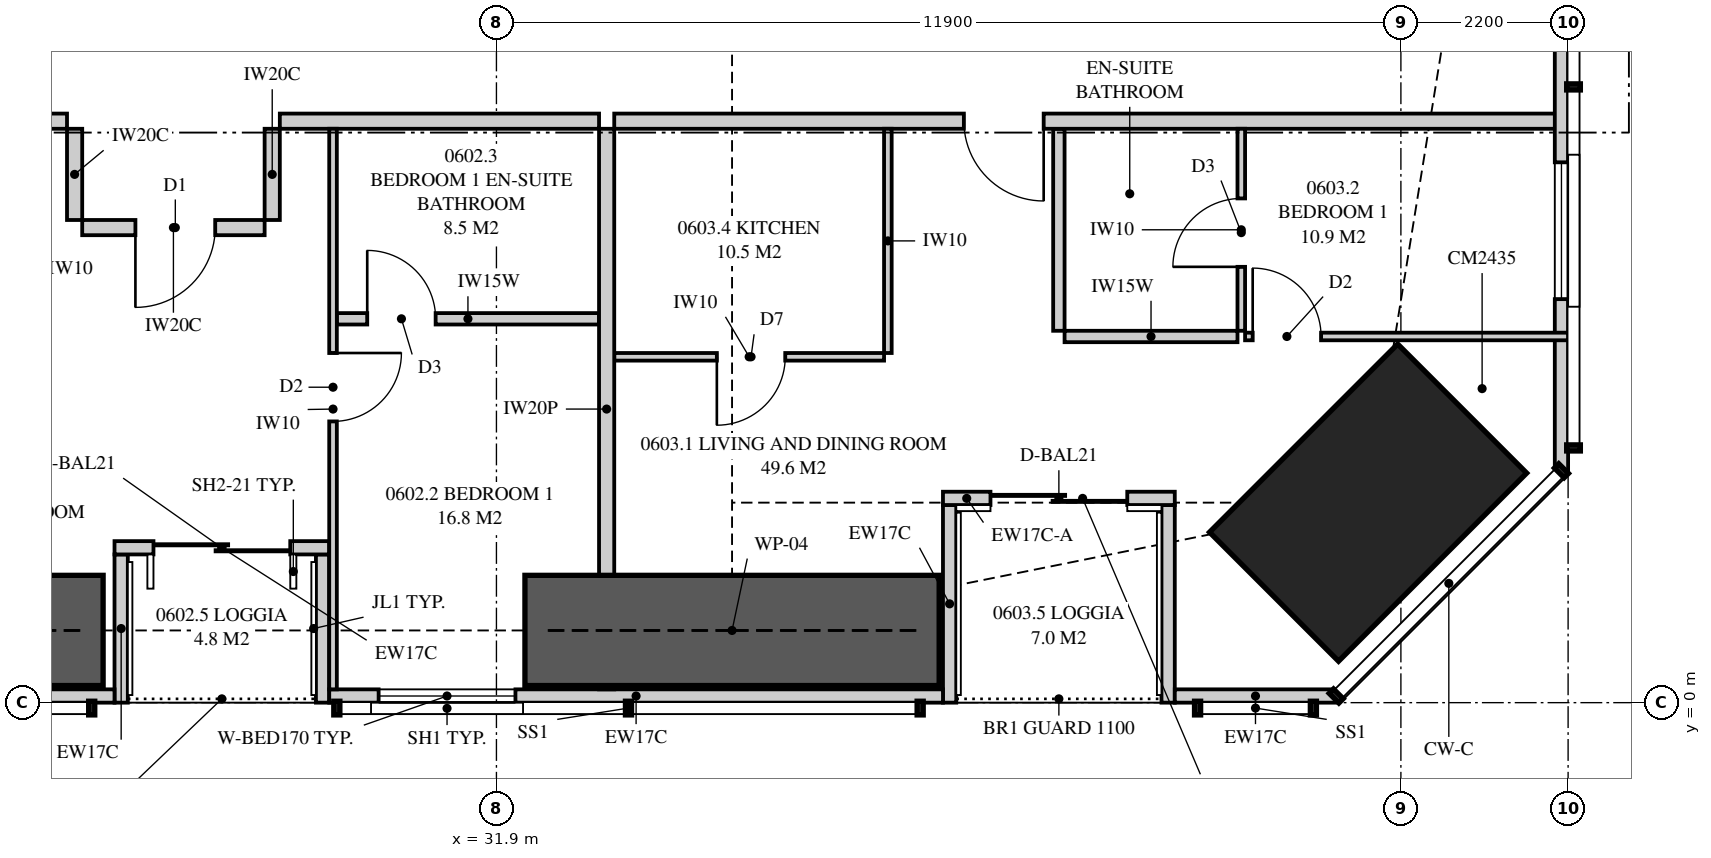
"""IFC4 building model, lengths in metres.
Left out: names, types, materials, properties, quantities, classifications, styles, units other than length and angle.
Written with IfcOpenShell. Run it as: python <this file> out.ifc"""

import sys

from ifc_helpers import new_model, si_unit, direction, frame, frame_2d, origin, origin_2d, place, context, subcontext, project, spatial, polyline, rectangle, outline, extrude, element, fill, save


model = new_model("IFC4")
c1 = context("Model", 3, precision=1e-05, world=origin(), true_north=direction((0.0, 1.0)))
c2 = subcontext(c1, "Body", "Model", "MODEL_VIEW")
j1 = project(units=[si_unit("LENGTHUNIT", "METRE"), si_unit("PLANEANGLEUNIT", "RADIAN")], contexts=[c1])
p1 = place(None, origin())
s1 = spatial("IfcSite", under=j1, at=p1, CompositionType="ELEMENT")
p2 = place(p1, origin())
s2 = spatial("IfcBuilding", under=s1, at=p2, CompositionType="ELEMENT")
p3 = place(p2, frame((0.0, 0.0, 27.7)))
s3 = spatial("IfcBuildingStorey", under=s2, at=p3, CompositionType="ELEMENT", Elevation=27.7)
p4 = place(p3, frame((43.369, 2.631, 0.0), z_axis=(0.0, 0.0, 1.0), x_axis=(-0.707106781187, 0.707106781187, 0.0)))
e1 = element("IfcColumn", 1, at=p4, inside=s3, PredefinedType="COLUMN", context=c2, shape_type="SweptSolid", body=[
    extrude(rectangle(XDim=2.4, YDim=3.5, at=origin_2d()), origin(), (0.0, 0.0, 1.0), 3.35),
])
p5 = place(p3, frame((19.025, 0.087, 0.0), z_axis=(0.0, 0.0, 1.0), x_axis=(1.0, 0.0, 0.0)))
e2 = element("IfcWall", 2, at=p5, inside=s3, PredefinedType="SOLIDWALL", context=c2, shape_type="SweptSolid", body=[
    extrude(rectangle(XDim=7.85, YDim=0.175, at=frame_2d((3.925, 0.0))), origin(), (0.0, 0.0, 1.0), 2.15),
])
p6 = place(p3, frame((29.7, 0.087, 0.0), z_axis=(0.0, 0.0, 1.0), x_axis=(1.0, 0.0, 0.0)))
e3 = element("IfcWall", 3, at=p6, inside=s3, PredefinedType="SOLIDWALL", context=c2, shape_type="SweptSolid", body=[
    extrude(outline(polyline([(0.0, 0.0), (8.075, 0.0), (8.075, 3.11), (5.504, 3.11), (5.504, 2.15), (5.456, 2.15), (5.456, 3.11), (5.3, 3.11), (5.3, 2.15), (0.0, 2.15), (0.0, 0.0)])), frame((0.0, 0.087, 0.0), z_axis=(0.0, -1.0, 0.0), x_axis=(1.0, 0.0, 0.0)), (0.0, 0.0, 1.0), 0.175),
])
p7 = place(p6, frame((0.65, 0.0, 0.4)))
e4 = element("IfcOpeningElement", 4, at=p7, cuts=e3, PredefinedType="OPENING", context=c2, shape_type="SweptSolid", body=[
    extrude(rectangle(XDim=1.8, YDim=1.7, at=frame_2d((0.9, 0.85))), frame((0.0, 0.097, 0.0), z_axis=(0.0, -1.0, 0.0), x_axis=(1.0, 0.0, 0.0)), (0.0, 0.0, 1.0), 0.195),
])
p8 = place(p3, frame((40.825, 0.087, 0.0), z_axis=(0.0, 0.0, 1.0), x_axis=(1.0, 0.0, 0.0)))
e5 = element("IfcWall", 5, at=p8, inside=s3, PredefinedType="SOLIDWALL", context=c2, shape_type="SweptSolid", body=[
    extrude(rectangle(XDim=2.124, YDim=0.175, at=frame_2d((1.062, 0.0))), origin(), (0.0, 0.0, 1.0), 3.11),
])
p9 = place(p3, frame((26.875, 2.038, 0.0), z_axis=(0.0, 0.0, 1.0), x_axis=(1.0, 0.0, 0.0)))
e6 = element("IfcWall", 6, at=p9, inside=s3, PredefinedType="SOLIDWALL", context=c2, shape_type="SweptSolid", body=[
    extrude(rectangle(XDim=2.825, YDim=0.175, at=frame_2d((1.413, 0.0))), origin(), (0.0, 0.0, 1.0), 3.11),
])
p10 = place(p9, frame((0.512, 0.0, 0.0)))
e7 = element("IfcOpeningElement", 7, at=p10, cuts=e6, PredefinedType="OPENING", context=c2, shape_type="SweptSolid", body=[
    extrude(rectangle(XDim=1.8, YDim=2.1, at=frame_2d((0.9, 1.05))), frame((0.0, 0.097, 0.0), z_axis=(0.0, -1.0, 0.0), x_axis=(1.0, 0.0, 0.0)), (0.0, 0.0, 1.0), 0.195),
])
for number, where, z_axis, x_axis in (
    (8, (26.962, 0.0, 0.0), (0.0, 0.0, 1.0), (0.0, 1.0, 0.0)),
    (9, (29.613, 0.0, 0.0), (0.0, 0.0, 1.0), (0.0, 1.0, 0.0)),
):
    element("IfcWall", number, at=place(p3, frame(where, z_axis=z_axis, x_axis=x_axis)), inside=s3, PredefinedType="SOLIDWALL", context=c2, shape_type="SweptSolid", body=[
        extrude(outline(polyline([(0.0, 0.0), (1.95, 0.0), (1.95, 3.11), (1.75, 3.11), (1.75, 2.15), (0.15, 2.15), (0.15, 3.11), (0.0, 3.11), (0.0, 0.0)])), frame((0.0, 0.087, 0.0), z_axis=(0.0, -1.0, 0.0), x_axis=(1.0, 0.0, 0.0)), (0.0, 0.0, 1.0), 0.175),
    ])
p11 = place(p3, frame((37.775, 2.688, 0.0), z_axis=(0.0, 0.0, 1.0), x_axis=(1.0, 0.0, 0.0)))
e10 = element("IfcWall", 10, at=p11, inside=s3, PredefinedType="SOLIDWALL", context=c2, shape_type="SweptSolid", body=[
    extrude(rectangle(XDim=0.625, YDim=0.175, at=frame_2d((0.312, 0.0))), origin(), (0.0, 0.0, 1.0), 2.51),
])
p12 = place(p3, frame((38.4, 2.688, 0.0), z_axis=(0.0, 0.0, 1.0), x_axis=(1.0, 0.0, 0.0)))
e11 = element("IfcWall", 11, at=p12, inside=s3, PredefinedType="SOLIDWALL", context=c2, shape_type="SweptSolid", body=[
    extrude(rectangle(XDim=2.425, YDim=0.175, at=frame_2d((1.212, 0.0))), origin(), (0.0, 0.0, 1.0), 2.15),
])
p13 = place(p12, origin())
e12 = element("IfcOpeningElement", 12, at=p13, cuts=e11, PredefinedType="OPENING", context=c2, shape_type="SweptSolid", body=[
    extrude(rectangle(XDim=1.8, YDim=2.1, at=frame_2d((0.9, 1.05))), frame((0.0, 0.097, 0.0), z_axis=(0.0, -1.0, 0.0), x_axis=(1.0, 0.0, 0.0)), (0.0, 0.0, 1.0), 0.195),
])
p14 = place(p3, frame((37.863, 0.0, 0.0), z_axis=(0.0, 0.0, 1.0), x_axis=(0.0, 1.0, 0.0)))
e13 = element("IfcWall", 13, at=p14, inside=s3, PredefinedType="SOLIDWALL", context=c2, shape_type="SweptSolid", body=[
    extrude(outline(polyline([(0.0, 0.0), (2.6, 0.0), (2.6, 2.51), (2.359, 2.51), (2.359, 2.15), (0.692, 2.15), (0.692, 3.11), (0.0, 3.11), (0.0, 0.0)])), frame((0.0, 0.087, 0.0), z_axis=(0.0, -1.0, 0.0), x_axis=(1.0, 0.0, 0.0)), (0.0, 0.0, 1.0), 0.175),
])
p15 = place(p3, frame((40.738, 0.0, 0.0), z_axis=(0.0, 0.0, 1.0), x_axis=(0.0, 1.0, 0.0)))
e14 = element("IfcWall", 14, at=p15, inside=s3, PredefinedType="SOLIDWALL", context=c2, shape_type="SweptSolid", body=[
    extrude(outline(polyline([(0.0, 0.0), (2.6, 0.0), (2.6, 2.15), (1.269, 2.15), (1.269, 3.11), (0.0, 3.11), (0.0, 0.0)])), frame((0.0, 0.087, 0.0), z_axis=(0.0, -1.0, 0.0), x_axis=(1.0, 0.0, 0.0)), (0.0, 0.0, 1.0), 0.175),
])
p16 = place(p3, frame((45.913, 3.051, 0.0), z_axis=(0.0, 0.0, 1.0), x_axis=(0.0, 1.0, 0.0)))
e15 = element("IfcWall", 15, at=p16, inside=s3, PredefinedType="SOLIDWALL", context=c2, shape_type="SweptSolid", body=[
    extrude(outline(polyline([(0.0, 0.0), (31.897, 0.0), (31.897, 3.11), (22.167, 3.11), (22.167, 2.15), (22.074, 2.15), (22.074, 3.11), (21.949, 3.11), (21.949, 2.15), (9.949, 2.15), (9.949, 3.11), (9.823, 3.11), (9.823, 2.15), (9.73, 2.15), (9.73, 3.11), (0.0, 3.11), (0.0, 0.0)])), frame((0.0, 0.087, 0.0), z_axis=(0.0, -1.0, 0.0), x_axis=(1.0, 0.0, 0.0)), (0.0, 0.0, 1.0), 0.175),
])
p17 = place(p16, frame((2.257, 0.0, 0.4)))
e16 = element("IfcOpeningElement", 16, at=p17, cuts=e15, PredefinedType="OPENING", context=c2, shape_type="SweptSolid", body=[
    extrude(rectangle(XDim=1.8, YDim=1.7, at=frame_2d((0.9, 0.85))), frame((0.0, 0.097, 0.0), z_axis=(0.0, -1.0, 0.0), x_axis=(1.0, 0.0, 0.0)), (0.0, 0.0, 1.0), 0.195),
])
p18 = place(p16, frame((14.849, 0.0, 0.4)))
e17 = element("IfcOpeningElement", 17, at=p18, cuts=e15, PredefinedType="OPENING", context=c2, shape_type="SweptSolid", body=[
    extrude(rectangle(XDim=1.2, YDim=1.7, at=frame_2d((0.6, 0.85))), frame((0.0, 0.097, 0.0), z_axis=(0.0, -1.0, 0.0), x_axis=(1.0, 0.0, 0.0)), (0.0, 0.0, 1.0), 0.195),
])
p19 = place(p16, frame((27.34, 0.0, 0.4)))
e18 = element("IfcOpeningElement", 18, at=p19, cuts=e15, PredefinedType="OPENING", context=c2, shape_type="SweptSolid", body=[
    extrude(rectangle(XDim=1.8, YDim=1.7, at=frame_2d((0.9, 0.85))), frame((0.0, 0.097, 0.0), z_axis=(0.0, -1.0, 0.0), x_axis=(1.0, 0.0, 0.0)), (0.0, 0.0, 1.0), 0.195),
])
p20 = place(p3, frame((33.35, 0.175, 0.0), z_axis=(0.0, 0.0, 1.0), x_axis=(0.0, 1.0, 0.0)))
e19 = element("IfcWall", 19, at=p20, inside=s3, PredefinedType="PARTITIONING", context=c2, shape_type="SweptSolid", body=[
    extrude(outline(polyline([(0.529, 2.15), (0.0, 2.15), (0.0, 0.0), (0.529, 0.0), (0.529, 0.366), (1.021, 0.366), (1.021, 0.0), (7.375, 0.0), (7.375, 3.11), (1.685, 3.11), (1.685, 2.15), (1.021, 2.15), (1.021, 1.784), (0.529, 1.784), (0.529, 2.15)])), frame((0.0, 0.1, 0.0), z_axis=(0.0, -1.0, 0.0), x_axis=(1.0, 0.0, 0.0)), (0.0, 0.0, 1.0), 0.2),
])
p21 = place(p3, frame((22.05, 7.65, 0.0), z_axis=(0.0, 0.0, 1.0), x_axis=(1.0, 0.0, 0.0)))
e20 = element("IfcWall", 20, at=p21, inside=s3, PredefinedType="PARTITIONING", context=c2, shape_type="SweptSolid", body=[
    extrude(outline(polyline([(0.0, 0.0), (4.2, 0.0), (4.2, 3.11), (2.287, 3.11), (2.287, 2.541), (1.613, 2.541), (1.613, 3.11), (0.0, 3.11), (0.0, 0.0)])), frame((0.0, 0.1, 0.0), z_axis=(0.0, -1.0, 0.0), x_axis=(1.0, 0.0, 0.0)), (0.0, 0.0, 1.0), 0.2),
])
p22 = place(p3, frame((29.75, 0.175, 0.0), z_axis=(0.0, 0.0, 1.0), x_axis=(0.0, 1.0, 0.0)))
e21 = element("IfcWall", 21, at=p22, inside=s3, PredefinedType="PARTITIONING", context=c2, shape_type="SweptSolid", body=[
    extrude(outline(polyline([(0.0, 0.0), (7.375, 0.0), (7.375, 3.11), (1.635, 3.11), (1.635, 2.15), (0.0, 2.15), (0.0, 3.11), (0.0, 0.0)])), frame((0.0, 0.05, 0.0), z_axis=(0.0, -1.0, 0.0), x_axis=(1.0, 0.0, 0.0)), (0.0, 0.0, 1.0), 0.1),
])
p23 = place(p22, frame((3.525, 0.0, 0.0)))
e22 = element("IfcOpeningElement", 22, at=p23, cuts=e21, PredefinedType="OPENING", context=c2, shape_type="SweptSolid", body=[
    extrude(rectangle(XDim=0.9, YDim=2.1, at=frame_2d((0.45, 1.05))), frame((0.0, 0.06, 0.0), z_axis=(0.0, -1.0, 0.0), x_axis=(1.0, 0.0, 0.0)), (0.0, 0.0, 1.0), 0.12),
])
p24 = place(p3, frame((29.8, 5.05, 0.0), z_axis=(0.0, 0.0, 1.0), x_axis=(1.0, 0.0, 0.0)))
e23 = element("IfcWall", 23, at=p24, inside=s3, PredefinedType="PLUMBINGWALL", context=c2, shape_type="SweptSolid", body=[
    extrude(rectangle(XDim=3.45, YDim=0.15, at=frame_2d((1.725, 0.0))), origin(), (0.0, 0.0, 1.0), 3.11),
])
p25 = place(p24, frame((0.4, 0.0, 0.0)))
e24 = element("IfcOpeningElement", 24, at=p25, cuts=e23, PredefinedType="OPENING", context=c2, shape_type="SweptSolid", body=[
    extrude(rectangle(XDim=0.9, YDim=2.1, at=frame_2d((0.45, 1.05))), frame((0.0, 0.085, 0.0), z_axis=(0.0, -1.0, 0.0), x_axis=(1.0, 0.0, 0.0)), (0.0, 0.0, 1.0), 0.17),
])
p26 = place(p3, frame((33.45, 7.65, 0.0), z_axis=(0.0, 0.0, 1.0), x_axis=(1.0, 0.0, 0.0)))
e25 = element("IfcWall", 25, at=p26, inside=s3, PredefinedType="PARTITIONING", context=c2, shape_type="SweptSolid", body=[
    extrude(outline(polyline([(0.0, 0.0), (12.55, 0.0), (12.55, 3.11), (11.654, 3.11), (11.654, 2.15), (9.811, 2.15), (9.811, 3.11), (1.887, 3.11), (1.887, 2.541), (1.213, 2.541), (1.213, 3.11), (0.0, 3.11), (0.0, 0.0)])), frame((0.0, 0.1, 0.0), z_axis=(0.0, -1.0, 0.0), x_axis=(1.0, 0.0, 0.0)), (0.0, 0.0, 1.0), 0.2),
])
p27 = place(p26, frame((4.6, 0.0, 0.0)))
e26 = element("IfcOpeningElement", 26, at=p27, cuts=e25, PredefinedType="OPENING", context=c2, shape_type="SweptSolid", body=[
    extrude(rectangle(XDim=1.05, YDim=2.2, at=frame_2d((0.525, 1.1))), frame((0.0, 0.11, 0.0), z_axis=(0.0, -1.0, 0.0), x_axis=(1.0, 0.0, 0.0)), (0.0, 0.0, 1.0), 0.22),
])
p28 = place(p3, frame((41.7, 4.892, 0.0), z_axis=(0.0, 0.0, 1.0), x_axis=(0.0, 1.0, 0.0)))
e27 = element("IfcWall", 27, at=p28, inside=s3, PredefinedType="PARTITIONING", context=c2, shape_type="SweptSolid", body=[
    extrude(rectangle(XDim=2.658, YDim=0.1, at=frame_2d((1.329, 0.0))), origin(), (0.0, 0.0, 1.0), 3.11),
])
p29 = place(p28, frame((0.841, 0.0, 0.0)))
e28 = element("IfcOpeningElement", 28, at=p29, cuts=e27, PredefinedType="OPENING", context=c2, shape_type="SweptSolid", body=[
    extrude(rectangle(XDim=0.9, YDim=2.1, at=frame_2d((0.45, 1.05))), frame((0.0, 0.06, 0.0), z_axis=(0.0, -1.0, 0.0), x_axis=(1.0, 0.0, 0.0)), (0.0, 0.0, 1.0), 0.12),
])
p30 = place(p3, frame((41.75, 4.817, 0.0), z_axis=(0.0, 0.0, 1.0), x_axis=(1.0, 0.0, 0.0)))
e29 = element("IfcWall", 29, at=p30, inside=s3, PredefinedType="PARTITIONING", context=c2, shape_type="SweptSolid", body=[
    extrude(outline(polyline([(0.0, 0.0), (4.25, 0.0), (4.25, 3.11), (2.844, 3.11), (2.844, 2.15), (1.102, 2.15), (1.102, 3.11), (0.0, 3.11), (0.0, 0.0)])), frame((0.0, 0.05, 0.0), z_axis=(0.0, -1.0, 0.0), x_axis=(1.0, 0.0, 0.0)), (0.0, 0.0, 1.0), 0.1),
])
p31 = place(p30, frame((0.1, 0.0, 0.0)))
e30 = element("IfcOpeningElement", 30, at=p31, cuts=e29, PredefinedType="OPENING", context=c2, shape_type="SweptSolid", body=[
    extrude(rectangle(XDim=0.9, YDim=2.1, at=frame_2d((0.45, 1.05))), frame((0.0, 0.06, 0.0), z_axis=(0.0, -1.0, 0.0), x_axis=(1.0, 0.0, 0.0)), (0.0, 0.0, 1.0), 0.12),
])
p32 = place(p3, frame((39.375, 4.817, 0.0), z_axis=(0.0, 0.0, 1.0), x_axis=(1.0, 0.0, 0.0)))
e31 = element("IfcWall", 31, at=p32, inside=s3, PredefinedType="PLUMBINGWALL", context=c2, shape_type="SweptSolid", body=[
    extrude(rectangle(XDim=2.275, YDim=0.15, at=frame_2d((1.137, 0.0))), origin(), (0.0, 0.0, 1.0), 3.11),
])
p33 = place(p3, frame((39.3, 4.892, 0.0), z_axis=(0.0, 0.0, 1.0), x_axis=(0.0, 1.0, 0.0)))
e32 = element("IfcWall", 32, at=p33, inside=s3, PredefinedType="PLUMBINGWALL", context=c2, shape_type="SweptSolid", body=[
    extrude(rectangle(XDim=2.658, YDim=0.15, at=frame_2d((1.329, 0.0))), origin(), (0.0, 0.0, 1.0), 3.11),
])
p34 = place(p3, frame((33.45, 4.55, 0.0), z_axis=(0.0, 0.0, 1.0), x_axis=(1.0, 0.0, 0.0)))
e33 = element("IfcWall", 33, at=p34, inside=s3, PredefinedType="PARTITIONING", context=c2, shape_type="SweptSolid", body=[
    extrude(outline(polyline([(0.0, 0.0), (3.55, 0.0), (3.55, 3.11), (1.837, 3.11), (1.837, 2.541), (1.263, 2.541), (1.263, 3.11), (0.0, 3.11), (0.0, 0.0)])), frame((0.0, 0.05, 0.0), z_axis=(0.0, -1.0, 0.0), x_axis=(1.0, 0.0, 0.0)), (0.0, 0.0, 1.0), 0.1),
])
p35 = place(p34, frame((1.35, 0.0, 0.0)))
e34 = element("IfcOpeningElement", 34, at=p35, cuts=e33, PredefinedType="OPENING", context=c2, shape_type="SweptSolid", body=[
    extrude(rectangle(XDim=0.9, YDim=2.1, at=frame_2d((0.45, 1.05))), frame((0.0, 0.06, 0.0), z_axis=(0.0, -1.0, 0.0), x_axis=(1.0, 0.0, 0.0)), (0.0, 0.0, 1.0), 0.12),
])
p36 = place(p3, frame((37.05, 4.6, 0.0), z_axis=(0.0, 0.0, 1.0), x_axis=(0.0, 1.0, 0.0)))
e35 = element("IfcWall", 35, at=p36, inside=s3, PredefinedType="PARTITIONING", context=c2, shape_type="SweptSolid", body=[
    extrude(rectangle(XDim=2.95, YDim=0.1, at=frame_2d((1.475, 0.0))), origin(), (0.0, 0.0, 1.0), 3.11),
])
p37 = place(p3, frame((29.05, 7.65, 0.0), z_axis=(0.0, 0.0, 1.0), x_axis=(1.0, 0.0, 0.0)))
e36 = element("IfcWall", 36, at=p37, inside=s3, PredefinedType="PARTITIONING", context=c2, shape_type="SweptSolid", body=[
    extrude(rectangle(XDim=4.2, YDim=0.2, at=frame_2d((2.1, 0.0))), origin(), (0.0, 0.0, 1.0), 3.11),
])
p38 = place(p3, frame((26.45, 6.25, 0.0), z_axis=(0.0, 0.0, 1.0), x_axis=(1.0, 0.0, 0.0)))
e37 = element("IfcWall", 37, at=p38, inside=s3, PredefinedType="PARTITIONING", context=c2, shape_type="SweptSolid", body=[
    extrude(rectangle(XDim=2.4, YDim=0.2, at=frame_2d((1.2, 0.0))), origin(), (0.0, 0.0, 1.0), 3.11),
])
p39 = place(p38, frame((0.7, 0.0, 0.0)))
e38 = element("IfcOpeningElement", 38, at=p39, cuts=e37, PredefinedType="OPENING", context=c2, shape_type="SweptSolid", body=[
    extrude(rectangle(XDim=1.05, YDim=2.2, at=frame_2d((0.525, 1.1))), frame((0.0, 0.11, 0.0), z_axis=(0.0, -1.0, 0.0), x_axis=(1.0, 0.0, 0.0)), (0.0, 0.0, 1.0), 0.22),
])
for number, where, z_axis, x_axis in (
    (39, (26.35, 7.55, 0.0), (0.0, 0.0, 1.0), (0.0, -1.0, 0.0)),
    (40, (28.95, 7.55, 0.0), (0.0, 0.0, 1.0), (0.0, -1.0, 0.0)),
):
    element("IfcWall", number, at=place(p3, frame(where, z_axis=z_axis, x_axis=x_axis)), inside=s3, PredefinedType="PARTITIONING", context=c2, shape_type="SweptSolid", body=[
        extrude(rectangle(XDim=1.2, YDim=0.2, at=frame_2d((0.6, 0.0))), origin(), (0.0, 0.0, 1.0), 3.11),
    ])
for number, where, z_axis, x_axis in (
    (41, (21.275, 0.95, 0.0), (0.0, 0.0, 1.0), (1.0, 0.0, 0.0)),
    (42, (32.275, 0.95, 0.0), (0.0, 0.0, 1.0), (1.0, 0.0, 0.0)),
):
    element("IfcWall", number, at=place(p3, frame(where, z_axis=z_axis, x_axis=x_axis)), inside=s3, PredefinedType="SHEAR", context=c2, shape_type="SweptSolid", body=[
        extrude(rectangle(XDim=5.45, YDim=1.45, at=frame_2d((2.725, 0.0))), origin(), (0.0, 0.0, 1.0), 3.35),
    ])
p40 = place(p10, origin())
e43 = element("IfcDoor", 43, at=p40, inside=s3, OperationType="SLIDING_TO_LEFT", PredefinedType="DOOR", context=c2, shape_type="SweptSolid", body=[
    extrude(rectangle(XDim=1.8, YDim=2.1, at=frame_2d((0.9, 1.05))), frame((0.0, 0.025, 0.0), z_axis=(0.0, -1.0, 0.0), x_axis=(1.0, 0.0, 0.0)), (0.0, 0.0, 1.0), 0.05),
])
fill(e7, e43)
p41 = place(p7, origin())
e44 = element("IfcWindow", 44, at=p41, inside=s3, PartitioningType="SINGLE_PANEL", PredefinedType="WINDOW", context=c2, shape_type="SweptSolid", body=[
    extrude(rectangle(XDim=1.8, YDim=1.7, at=frame_2d((0.9, 0.85))), frame((0.0, 0.03, 0.0), z_axis=(0.0, -1.0, 0.0), x_axis=(1.0, 0.0, 0.0)), (0.0, 0.0, 1.0), 0.06),
])
fill(e4, e44)
p42 = place(p13, origin())
e45 = element("IfcDoor", 45, at=p42, inside=s3, OperationType="SLIDING_TO_LEFT", PredefinedType="DOOR", context=c2, shape_type="SweptSolid", body=[
    extrude(rectangle(XDim=1.8, YDim=2.1, at=frame_2d((0.9, 1.05))), frame((0.0, 0.025, 0.0), z_axis=(0.0, -1.0, 0.0), x_axis=(1.0, 0.0, 0.0)), (0.0, 0.0, 1.0), 0.05),
])
fill(e12, e45)
p43 = place(p17, origin())
e46 = element("IfcWindow", 46, at=p43, inside=s3, PartitioningType="SINGLE_PANEL", PredefinedType="WINDOW", context=c2, shape_type="SweptSolid", body=[
    extrude(rectangle(XDim=1.8, YDim=1.7, at=frame_2d((0.9, 0.85))), frame((0.0, 0.03, 0.0), z_axis=(0.0, -1.0, 0.0), x_axis=(1.0, 0.0, 0.0)), (0.0, 0.0, 1.0), 0.06),
])
fill(e16, e46)
p44 = place(p39, frame((1.05, 0.0, 0.0), z_axis=(0.0, 0.0, 1.0), x_axis=(-1.0, 0.0, 0.0)))
e47 = element("IfcDoor", 47, at=p44, inside=s3, OperationType="SINGLE_SWING_RIGHT", PredefinedType="DOOR", context=c2, shape_type="SweptSolid", body=[
    extrude(rectangle(XDim=1.05, YDim=2.2, at=frame_2d((0.525, 1.1))), frame((0.0, 0.025, 0.0), z_axis=(0.0, -1.0, 0.0), x_axis=(1.0, 0.0, 0.0)), (0.0, 0.0, 1.0), 0.05),
])
fill(e38, e47)
p45 = place(p23, frame((0.9, 0.0, 0.0), z_axis=(0.0, 0.0, 1.0), x_axis=(-1.0, 0.0, 0.0)))
e48 = element("IfcDoor", 48, at=p45, inside=s3, OperationType="SINGLE_SWING_LEFT", PredefinedType="DOOR", context=c2, shape_type="SweptSolid", body=[
    extrude(rectangle(XDim=0.9, YDim=2.1, at=frame_2d((0.45, 1.05))), frame((0.0, 0.025, 0.0), z_axis=(0.0, -1.0, 0.0), x_axis=(1.0, 0.0, 0.0)), (0.0, 0.0, 1.0), 0.05),
])
fill(e22, e48)
p46 = place(p25, origin())
e49 = element("IfcDoor", 49, at=p46, inside=s3, OperationType="SINGLE_SWING_LEFT", PredefinedType="DOOR", context=c2, shape_type="SweptSolid", body=[
    extrude(rectangle(XDim=0.9, YDim=2.1, at=frame_2d((0.45, 1.05))), frame((0.0, 0.025, 0.0), z_axis=(0.0, -1.0, 0.0), x_axis=(1.0, 0.0, 0.0)), (0.0, 0.0, 1.0), 0.05),
])
fill(e24, e49)
p47 = place(p27, frame((1.05, 0.0, 0.0), z_axis=(0.0, 0.0, 1.0), x_axis=(-1.0, 0.0, 0.0)))
e50 = element("IfcDoor", 50, at=p47, inside=s3, OperationType="SINGLE_SWING_LEFT", PredefinedType="DOOR", context=c2, shape_type="SweptSolid", body=[
    extrude(rectangle(XDim=1.05, YDim=2.2, at=frame_2d((0.525, 1.1))), frame((0.0, 0.025, 0.0), z_axis=(0.0, -1.0, 0.0), x_axis=(1.0, 0.0, 0.0)), (0.0, 0.0, 1.0), 0.05),
])
fill(e26, e50)
p48 = place(p31, origin())
e51 = element("IfcDoor", 51, at=p48, inside=s3, OperationType="SINGLE_SWING_LEFT", PredefinedType="DOOR", context=c2, shape_type="SweptSolid", body=[
    extrude(rectangle(XDim=0.9, YDim=2.1, at=frame_2d((0.45, 1.05))), frame((0.0, 0.025, 0.0), z_axis=(0.0, -1.0, 0.0), x_axis=(1.0, 0.0, 0.0)), (0.0, 0.0, 1.0), 0.05),
])
fill(e30, e51)
p49 = place(p29, origin())
e52 = element("IfcDoor", 52, at=p49, inside=s3, OperationType="SINGLE_SWING_LEFT", PredefinedType="DOOR", context=c2, shape_type="SweptSolid", body=[
    extrude(rectangle(XDim=0.9, YDim=2.1, at=frame_2d((0.45, 1.05))), frame((0.0, 0.025, 0.0), z_axis=(0.0, -1.0, 0.0), x_axis=(1.0, 0.0, 0.0)), (0.0, 0.0, 1.0), 0.05),
])
fill(e28, e52)
p50 = place(p35, frame((0.9, 0.0, 0.0), z_axis=(0.0, 0.0, 1.0), x_axis=(-1.0, 0.0, 0.0)))
e53 = element("IfcDoor", 53, at=p50, inside=s3, OperationType="SINGLE_SWING_RIGHT", PredefinedType="DOOR", context=c2, shape_type="SweptSolid", body=[
    extrude(rectangle(XDim=0.9, YDim=2.1, at=frame_2d((0.45, 1.05))), frame((0.0, 0.025, 0.0), z_axis=(0.0, -1.0, 0.0), x_axis=(1.0, 0.0, 0.0)), (0.0, 0.0, 1.0), 0.05),
])
fill(e34, e53)
save(model, sys.argv[1])
